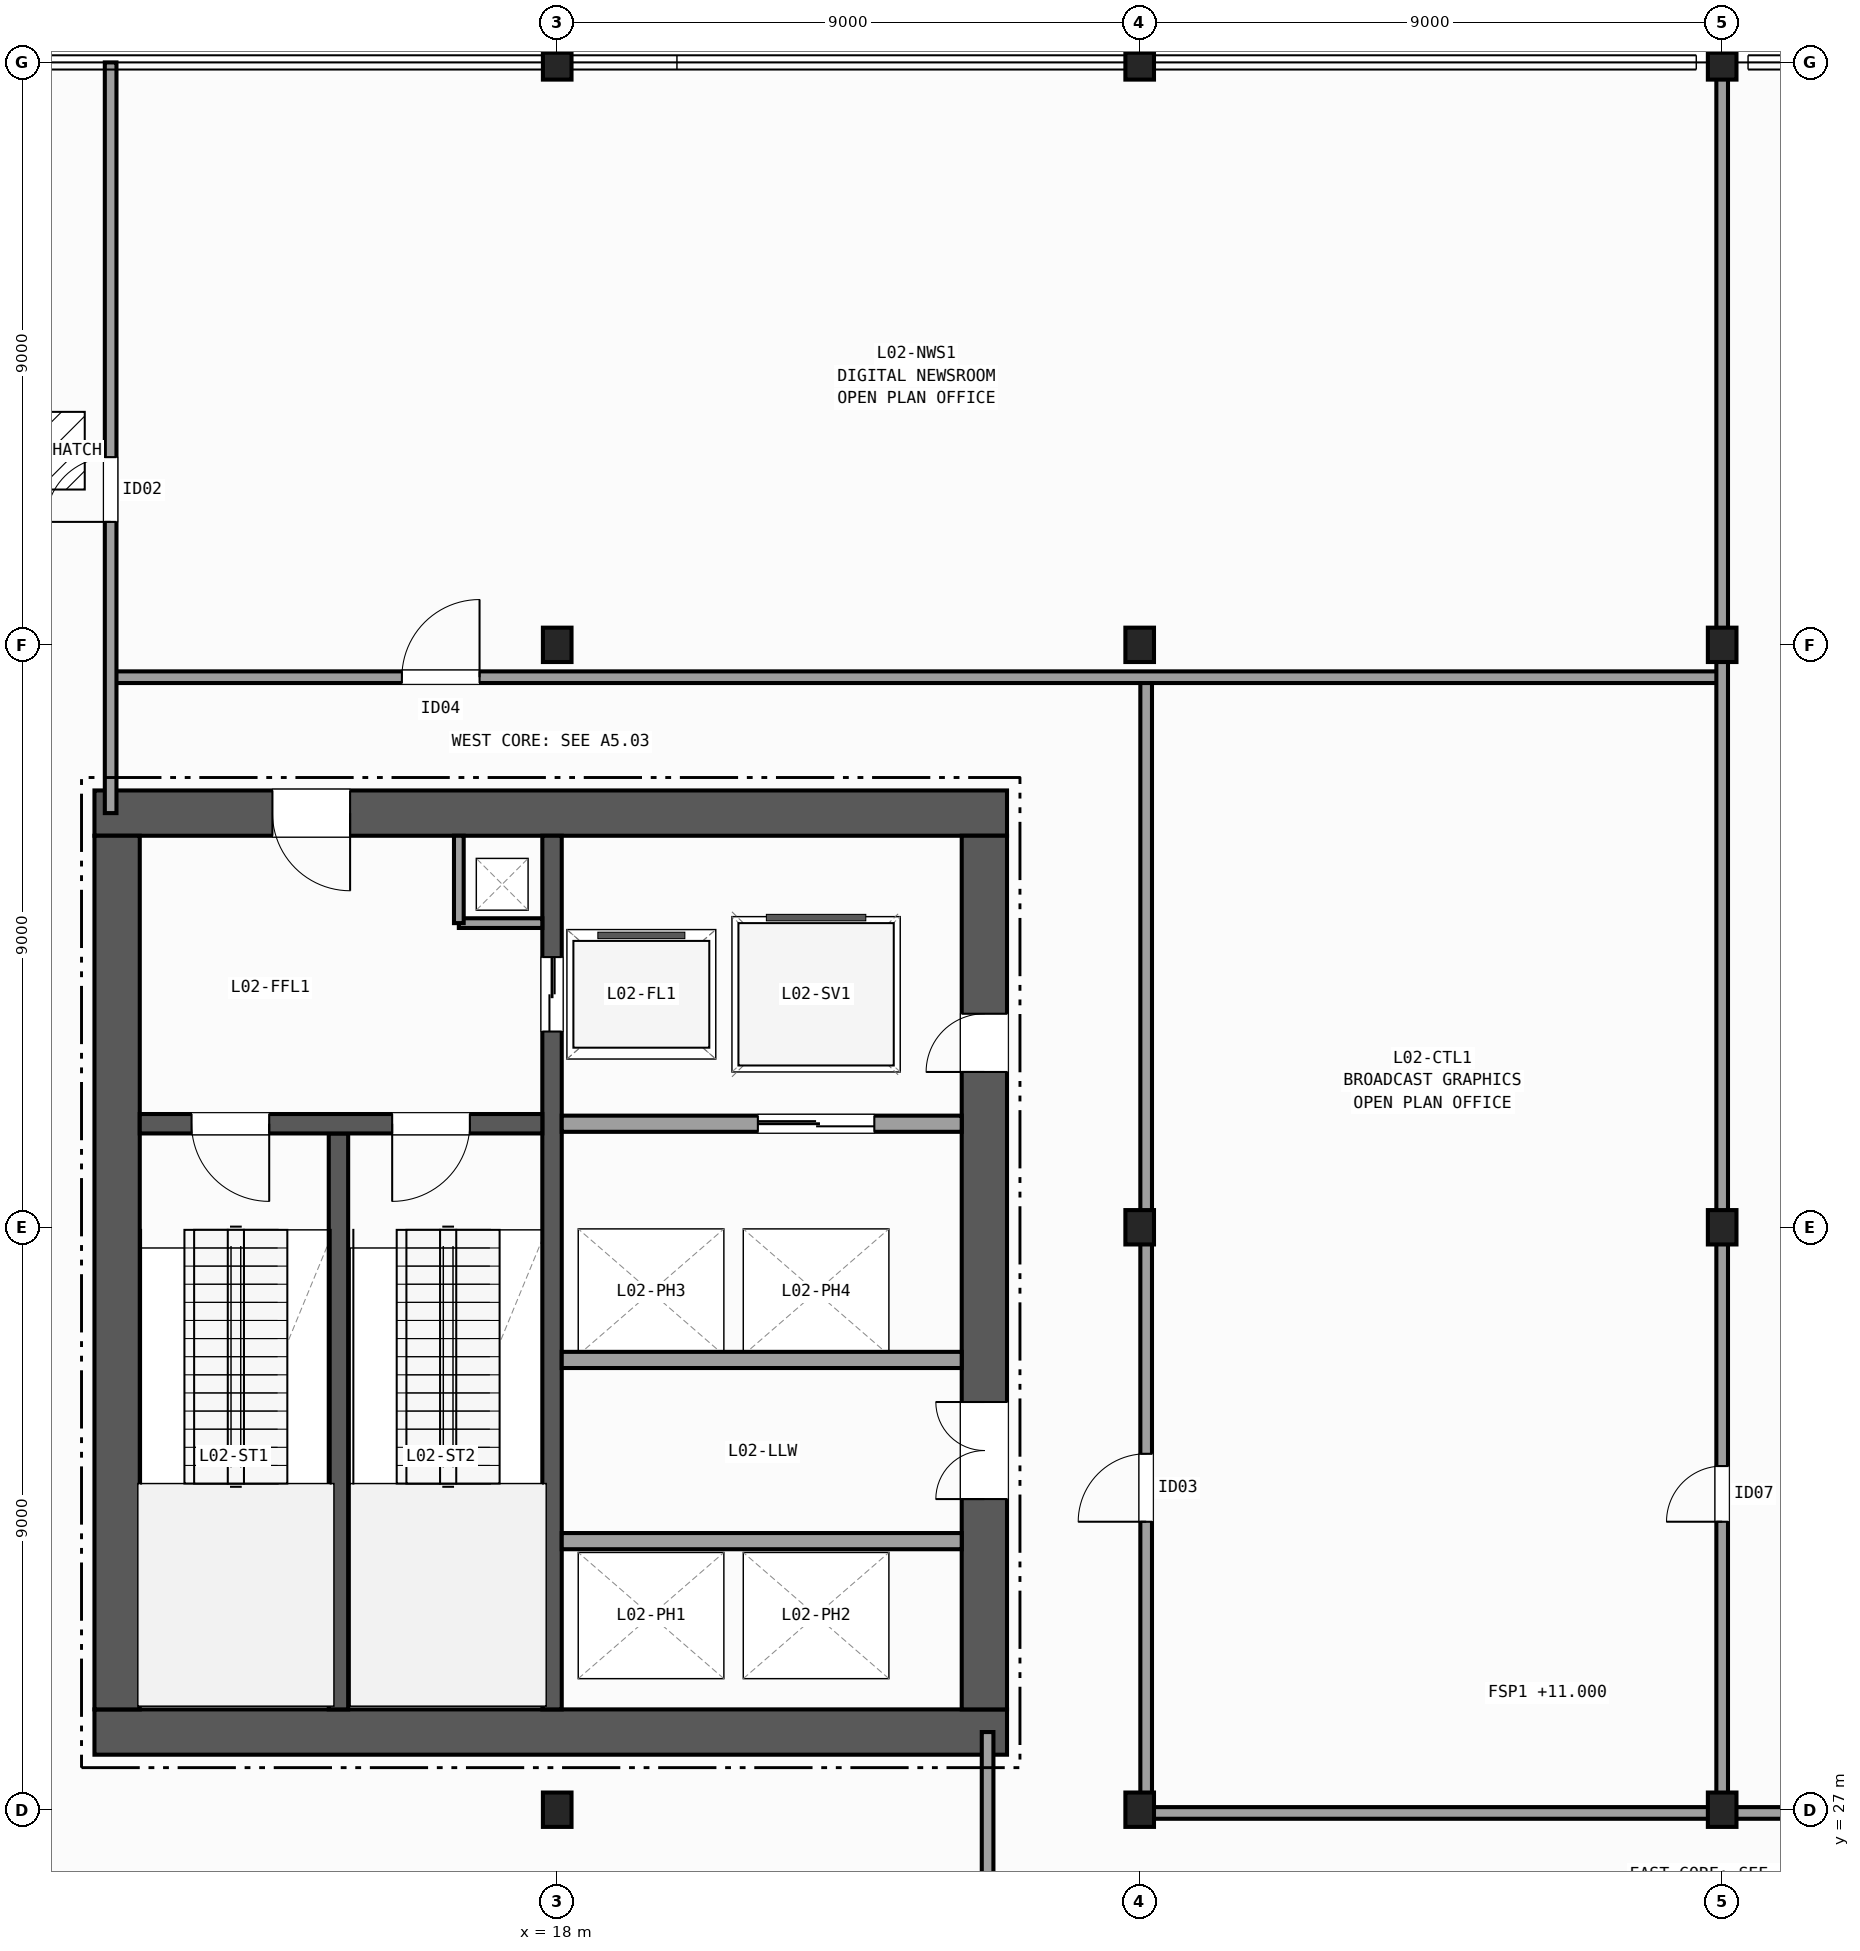
"""IFC4 building model, lengths in metres.
Left out: names, types, materials, properties, quantities, classifications, styles, units other than length and angle.
Written with IfcOpenShell. Run it as: python <this file> out.ifc"""

import sys

from ifc_helpers import new_model, si_unit, direction, frame, frame_2d, origin, origin_2d, place, context, subcontext, project, spatial, rectangle, i_section, extrude, element, fill, save


model = new_model("IFC4")
c1 = context("Model", 3, precision=1e-05, world=origin(), true_north=direction((0.0, 1.0)))
c2 = subcontext(c1, "Body", "Model", "MODEL_VIEW")
j1 = project(units=[si_unit("LENGTHUNIT", "METRE"), si_unit("PLANEANGLEUNIT", "RADIAN")], contexts=[c1])
p1 = place(None, origin())
s1 = spatial("IfcSite", under=j1, at=p1, CompositionType="ELEMENT")
p2 = place(p1, origin())
s2 = spatial("IfcBuilding", under=s1, at=p2, CompositionType="ELEMENT")
p3 = place(p2, frame((0.0, 0.0, 11.0)))
s3 = spatial("IfcBuildingStorey", under=s2, at=p3, CompositionType="ELEMENT", Elevation=11.0)
for number, where, z_axis, x_axis in (
    (1, (18.0, 27.0, 0.0), (0.0, 0.0, 1.0), (1.0, 0.0, 0.0)),
    (2, (18.0, 45.0, 0.0), (0.0, 0.0, 1.0), (1.0, 0.0, 0.0)),
    (3, (18.0, 54.0, 0.0), (0.0, 0.0, 1.0), (1.0, 0.0, 0.0)),
    (4, (27.0, 27.0, 0.0), (0.0, 0.0, 1.0), (1.0, 0.0, 0.0)),
    (5, (27.0, 36.0, 0.0), (0.0, 0.0, 1.0), (1.0, 0.0, 0.0)),
    (6, (27.0, 45.0, 0.0), (0.0, 0.0, 1.0), (1.0, 0.0, 0.0)),
    (7, (27.0, 54.0, 0.0), (0.0, 0.0, 1.0), (1.0, 0.0, 0.0)),
    (8, (36.0, 27.0, 0.0), (0.0, 0.0, 1.0), (1.0, 0.0, 0.0)),
    (9, (36.0, 36.0, 0.0), (0.0, 0.0, 1.0), (1.0, 0.0, 0.0)),
    (10, (36.0, 45.0, 0.0), (0.0, 0.0, 1.0), (1.0, 0.0, 0.0)),
    (11, (36.0, 54.0, 0.0), (0.0, 0.0, 1.0), (1.0, 0.0, 0.0)),
):
    element("IfcColumn", number, at=place(p3, frame(where, z_axis=z_axis, x_axis=x_axis)), inside=s3, PredefinedType="COLUMN", context=c2, shape_type="SweptSolid", body=[
        extrude(i_section(OverallWidth=0.442, OverallDepth=0.531, WebThickness=0.066, FlangeThickness=0.106, FilletRadius=0.015, at=origin_2d()), origin(), (0.0, 0.0, 1.0), 5.2),
    ])
p4 = place(p3, frame((10.85, 28.2, 0.0), z_axis=(0.0, 0.0, 1.0), x_axis=(1.0, 0.0, 0.0)))
e12 = element("IfcWall", 12, at=p4, inside=s3, PredefinedType="SHEAR", context=c2, shape_type="SweptSolid", body=[
    extrude(rectangle(XDim=14.1, YDim=0.7, at=frame_2d((7.05, 0.0))), origin(), (0.0, 0.0, 1.0), 4.88),
])
p5 = place(p3, frame((24.95, 42.4, 0.0), z_axis=(0.0, 0.0, 1.0), x_axis=(-1.0, 0.0, 0.0)))
e13 = element("IfcWall", 13, at=p5, inside=s3, PredefinedType="SHEAR", context=c2, shape_type="SweptSolid", body=[
    extrude(rectangle(XDim=14.1, YDim=0.7, at=frame_2d((7.05, 0.0))), origin(), (0.0, 0.0, 1.0), 4.88),
])
p6 = place(p5, frame((10.15, 0.0, 0.0)))
e14 = element("IfcOpeningElement", 14, at=p6, cuts=e13, PredefinedType="OPENING", context=c2, shape_type="SweptSolid", body=[
    extrude(rectangle(XDim=1.2, YDim=2.15, at=frame_2d((0.6, 1.075))), frame((0.0, 0.36, 0.0), z_axis=(0.0, -1.0, 0.0), x_axis=(1.0, 0.0, 0.0)), (0.0, 0.0, 1.0), 0.72),
])
p7 = place(p3, frame((11.2, 42.05, 0.0), z_axis=(0.0, 0.0, 1.0), x_axis=(0.0, -1.0, 0.0)))
e15 = element("IfcWall", 15, at=p7, inside=s3, PredefinedType="SHEAR", context=c2, shape_type="SweptSolid", body=[
    extrude(rectangle(XDim=13.5, YDim=0.7, at=frame_2d((6.75, 0.0))), origin(), (0.0, 0.0, 1.0), 4.88),
])
p8 = place(p3, frame((24.6, 28.55, 0.0), z_axis=(0.0, 0.0, 1.0), x_axis=(0.0, 1.0, 0.0)))
e16 = element("IfcWall", 16, at=p8, inside=s3, PredefinedType="SHEAR", context=c2, shape_type="SweptSolid", body=[
    extrude(rectangle(XDim=13.5, YDim=0.7, at=frame_2d((6.75, 0.0))), origin(), (0.0, 0.0, 1.0), 4.88),
])
p9 = place(p8, frame((3.25, 0.0, 0.0)))
e17 = element("IfcOpeningElement", 17, at=p9, cuts=e16, PredefinedType="OPENING", context=c2, shape_type="SweptSolid", body=[
    extrude(rectangle(XDim=1.5, YDim=2.2, at=frame_2d((0.75, 1.1))), frame((0.0, 0.36, 0.0), z_axis=(0.0, -1.0, 0.0), x_axis=(1.0, 0.0, 0.0)), (0.0, 0.0, 1.0), 0.72),
])
p10 = place(p8, frame((9.85, 0.0, 0.0)))
e18 = element("IfcOpeningElement", 18, at=p10, cuts=e16, PredefinedType="OPENING", context=c2, shape_type="SweptSolid", body=[
    extrude(rectangle(XDim=0.9, YDim=2.1, at=frame_2d((0.45, 1.05))), frame((0.0, 0.36, 0.0), z_axis=(0.0, -1.0, 0.0), x_axis=(1.0, 0.0, 0.0)), (0.0, 0.0, 1.0), 0.72),
])
p11 = place(p3, frame((14.62, 28.55, 0.0), z_axis=(0.0, 0.0, 1.0), x_axis=(0.0, 1.0, 0.0)))
e19 = element("IfcWall", 19, at=p11, inside=s3, PredefinedType="SHEAR", context=c2, shape_type="SweptSolid", body=[
    extrude(rectangle(XDim=8.9, YDim=0.3, at=frame_2d((4.45, 0.0))), origin(), (0.0, 0.0, 1.0), 4.88),
])
p12 = place(p3, frame((17.92, 42.05, 0.0), z_axis=(0.0, 0.0, 1.0), x_axis=(0.0, -1.0, 0.0)))
e20 = element("IfcWall", 20, at=p12, inside=s3, PredefinedType="SHEAR", context=c2, shape_type="SweptSolid", body=[
    extrude(rectangle(XDim=13.5, YDim=0.3, at=frame_2d((6.75, 0.0))), origin(), (0.0, 0.0, 1.0), 4.88),
])
p13 = place(p12, frame((1.875, 0.0, 0.0)))
e21 = element("IfcOpeningElement", 21, at=p13, cuts=e20, PredefinedType="OPENING", context=c2, shape_type="SweptSolid", body=[
    extrude(rectangle(XDim=1.15, YDim=2.15, at=frame_2d((0.575, 1.075))), frame((0.0, 0.16, 0.0), z_axis=(0.0, -1.0, 0.0), x_axis=(1.0, 0.0, 0.0)), (0.0, 0.0, 1.0), 0.32),
])
p14 = place(p3, frame((17.77, 37.6, 0.0), z_axis=(0.0, 0.0, 1.0), x_axis=(-1.0, 0.0, 0.0)))
e22 = element("IfcWall", 22, at=p14, inside=s3, PredefinedType="SHEAR", context=c2, shape_type="SweptSolid", body=[
    extrude(rectangle(XDim=6.22, YDim=0.3, at=frame_2d((3.11, 0.0))), origin(), (0.0, 0.0, 1.0), 4.88),
])
p15 = place(p14, frame((4.22, 0.0, 0.0)))
e23 = element("IfcOpeningElement", 23, at=p15, cuts=e22, PredefinedType="OPENING", context=c2, shape_type="SweptSolid", body=[
    extrude(rectangle(XDim=1.2, YDim=2.15, at=frame_2d((0.6, 1.075))), frame((0.0, 0.16, 0.0), z_axis=(0.0, -1.0, 0.0), x_axis=(1.0, 0.0, 0.0)), (0.0, 0.0, 1.0), 0.32),
])
p16 = place(p14, frame((1.12, 0.0, 0.0)))
e24 = element("IfcOpeningElement", 24, at=p16, cuts=e22, PredefinedType="OPENING", context=c2, shape_type="SweptSolid", body=[
    extrude(rectangle(XDim=1.2, YDim=2.15, at=frame_2d((0.6, 1.075))), frame((0.0, 0.16, 0.0), z_axis=(0.0, -1.0, 0.0), x_axis=(1.0, 0.0, 0.0)), (0.0, 0.0, 1.0), 0.32),
])
p17 = place(p3, frame((16.48, 40.7, 0.0), z_axis=(0.0, 0.0, 1.0), x_axis=(1.0, 0.0, 0.0)))
e25 = element("IfcWall", 25, at=p17, inside=s3, PredefinedType="PARTITIONING", context=c2, shape_type="SweptSolid", body=[
    extrude(rectangle(XDim=1.29, YDim=0.15, at=frame_2d((0.645, 0.0))), origin(), (0.0, 0.0, 1.0), 4.88),
])
p18 = place(p3, frame((16.48, 40.7, 0.0), z_axis=(0.0, 0.0, 1.0), x_axis=(0.0, 1.0, 0.0)))
e26 = element("IfcWall", 26, at=p18, inside=s3, PredefinedType="PARTITIONING", context=c2, shape_type="SweptSolid", body=[
    extrude(rectangle(XDim=1.35, YDim=0.15, at=frame_2d((0.675, 0.0))), origin(), (0.0, 0.0, 1.0), 4.88),
])
p19 = place(p3, frame((18.07, 37.6, 0.0), z_axis=(0.0, 0.0, 1.0), x_axis=(1.0, 0.0, 0.0)))
e27 = element("IfcWall", 27, at=p19, inside=s3, PredefinedType="PARTITIONING", context=c2, shape_type="SweptSolid", body=[
    extrude(rectangle(XDim=6.18, YDim=0.25, at=frame_2d((3.09, 0.0))), origin(), (0.0, 0.0, 1.0), 4.88),
])
p20 = place(p19, frame((3.03, 0.0, 0.0)))
e28 = element("IfcOpeningElement", 28, at=p20, cuts=e27, PredefinedType="OPENING", context=c2, shape_type="SweptSolid", body=[
    extrude(rectangle(XDim=1.8, YDim=2.3, at=frame_2d((0.9, 1.15))), frame((0.0, 0.135, 0.0), z_axis=(0.0, -1.0, 0.0), x_axis=(1.0, 0.0, 0.0)), (0.0, 0.0, 1.0), 0.27),
])
for number, where, z_axis, x_axis in (
    (29, (18.07, 31.15, 0.0), (0.0, 0.0, 1.0), (1.0, 0.0, 0.0)),
    (30, (24.25, 33.95, 0.0), (0.0, 0.0, 1.0), (-1.0, 0.0, 0.0)),
):
    element("IfcWall", number, at=place(p3, frame(where, z_axis=z_axis, x_axis=x_axis)), inside=s3, PredefinedType="PARTITIONING", context=c2, shape_type="SweptSolid", body=[
        extrude(rectangle(XDim=6.18, YDim=0.25, at=frame_2d((3.09, 0.0))), origin(), (0.0, 0.0, 1.0), 4.88),
    ])
p21 = place(p3, frame((24.65, 3.6, 0.0), z_axis=(0.0, 0.0, 1.0), x_axis=(0.0, 1.0, 0.0)))
e31 = element("IfcWall", 31, at=p21, inside=s3, PredefinedType="PARTITIONING", context=c2, shape_type="SweptSolid", body=[
    extrude(rectangle(XDim=24.6, YDim=0.18, at=frame_2d((12.3, 0.0))), origin(), (0.0, 0.0, 1.0), 3.912),
])
p22 = place(p21, frame((10.4, 0.0, 0.0)))
e32 = element("IfcOpeningElement", 32, at=p22, cuts=e31, PredefinedType="OPENING", context=c2, shape_type="SweptSolid", body=[
    extrude(rectangle(XDim=1.4, YDim=2.15, at=frame_2d((0.7, 1.075))), frame((0.0, 0.1, 0.0), z_axis=(0.0, -1.0, 0.0), x_axis=(1.0, 0.0, 0.0)), (0.0, 0.0, 1.0), 0.2),
])
p23 = place(p3, frame((27.1, 26.95, 0.0), z_axis=(0.0, 0.0, 1.0), x_axis=(1.0, 0.0, 0.0)))
e33 = element("IfcWall", 33, at=p23, inside=s3, PredefinedType="PARTITIONING", context=c2, shape_type="SweptSolid", body=[
    extrude(rectangle(XDim=35.9, YDim=0.18, at=frame_2d((17.95, 0.0))), origin(), (0.0, 0.0, 1.0), 3.933),
])
p24 = place(p3, frame((27.1, 26.95, 0.0), z_axis=(0.0, 0.0, 1.0), x_axis=(0.0, 1.0, 0.0)))
e34 = element("IfcWall", 34, at=p24, inside=s3, PredefinedType="PARTITIONING", context=c2, shape_type="SweptSolid", body=[
    extrude(rectangle(XDim=17.55, YDim=0.18, at=frame_2d((8.775, 0.0))), origin(), (0.0, 0.0, 1.0), 3.933),
])
p25 = place(p24, frame((4.5, 0.0, 0.0)))
e35 = element("IfcOpeningElement", 35, at=p25, cuts=e34, PredefinedType="OPENING", context=c2, shape_type="SweptSolid", body=[
    extrude(rectangle(XDim=1.05, YDim=2.15, at=frame_2d((0.525, 1.075))), frame((0.0, 0.1, 0.0), z_axis=(0.0, -1.0, 0.0), x_axis=(1.0, 0.0, 0.0)), (0.0, 0.0, 1.0), 0.2),
])
p26 = place(p3, frame((11.1, 44.5, 0.0), z_axis=(0.0, 0.0, 1.0), x_axis=(1.0, 0.0, 0.0)))
e36 = element("IfcWall", 36, at=p26, inside=s3, PredefinedType="PARTITIONING", context=c2, shape_type="SweptSolid", body=[
    extrude(rectangle(XDim=24.9, YDim=0.18, at=frame_2d((12.45, 0.0))), origin(), (0.0, 0.0, 1.0), 4.005),
])
p27 = place(p26, frame((4.5, 0.0, 0.0)))
e37 = element("IfcOpeningElement", 37, at=p27, cuts=e36, PredefinedType="OPENING", context=c2, shape_type="SweptSolid", body=[
    extrude(rectangle(XDim=1.2, YDim=2.15, at=frame_2d((0.6, 1.075))), frame((0.0, 0.1, 0.0), z_axis=(0.0, -1.0, 0.0), x_axis=(1.0, 0.0, 0.0)), (0.0, 0.0, 1.0), 0.2),
])
p28 = place(p3, frame((36.0, 26.95, 0.0), z_axis=(0.0, 0.0, 1.0), x_axis=(0.0, 1.0, 0.0)))
e38 = element("IfcWall", 38, at=p28, inside=s3, PredefinedType="PARTITIONING", context=c2, shape_type="SweptSolid", body=[
    extrude(rectangle(XDim=27.05, YDim=0.18, at=frame_2d((13.525, 0.0))), origin(), (0.0, 0.0, 1.0), 3.933),
])
p29 = place(p28, frame((4.5, 0.0, 0.0)))
e39 = element("IfcOpeningElement", 39, at=p29, cuts=e38, PredefinedType="OPENING", context=c2, shape_type="SweptSolid", body=[
    extrude(rectangle(XDim=0.86, YDim=2.05, at=frame_2d((0.43, 1.025))), frame((0.0, 0.1, 0.0), z_axis=(0.0, -1.0, 0.0), x_axis=(1.0, 0.0, 0.0)), (0.0, 0.0, 1.0), 0.2),
])
p30 = place(p3, frame((11.1, 42.4, 0.0), z_axis=(0.0, 0.0, 1.0), x_axis=(0.0, 1.0, 0.0)))
e40 = element("IfcWall", 40, at=p30, inside=s3, PredefinedType="PARTITIONING", context=c2, shape_type="SweptSolid", body=[
    extrude(rectangle(XDim=11.6, YDim=0.18, at=frame_2d((5.8, 0.0))), origin(), (0.0, 0.0, 1.0), 3.933),
])
p31 = place(p30, frame((4.5, 0.0, 0.0)))
e41 = element("IfcOpeningElement", 41, at=p31, cuts=e40, PredefinedType="OPENING", context=c2, shape_type="SweptSolid", body=[
    extrude(rectangle(XDim=1.0, YDim=2.1, at=frame_2d((0.5, 1.05))), frame((0.0, 0.1, 0.0), z_axis=(0.0, -1.0, 0.0), x_axis=(1.0, 0.0, 0.0)), (0.0, 0.0, 1.0), 0.2),
])
p32 = place(p3, frame((0.0, 0.0, -0.32)))
p33 = place(p32, frame((10.2, 48.0, 0.0)))
p34 = place(p33, frame((0.0, 0.0, 0.27)))
e42 = element("IfcDoor", 42, at=p34, inside=s3, OperationType="SINGLE_SWING_LEFT", PredefinedType="TRAPDOOR", context=c2, shape_type="SweptSolid", body=[
    extrude(rectangle(XDim=1.0, YDim=1.2, at=origin_2d()), origin(), (0.0, 0.0, 1.0), 0.05),
])
p35 = place(p15, origin())
e43 = element("IfcDoor", 43, at=p35, inside=s3, OperationType="SINGLE_SWING_LEFT", PredefinedType="DOOR", context=c2, shape_type="SweptSolid", body=[
    extrude(rectangle(XDim=1.2, YDim=2.15, at=frame_2d((0.6, 1.075))), frame((0.0, 0.025, 0.0), z_axis=(0.0, -1.0, 0.0), x_axis=(1.0, 0.0, 0.0)), (0.0, 0.0, 1.0), 0.05),
])
fill(e23, e43)
p36 = place(p16, origin())
e44 = element("IfcDoor", 44, at=p36, inside=s3, OperationType="SINGLE_SWING_RIGHT", PredefinedType="DOOR", context=c2, shape_type="SweptSolid", body=[
    extrude(rectangle(XDim=1.2, YDim=2.15, at=frame_2d((0.6, 1.075))), frame((0.0, 0.025, 0.0), z_axis=(0.0, -1.0, 0.0), x_axis=(1.0, 0.0, 0.0)), (0.0, 0.0, 1.0), 0.05),
])
fill(e24, e44)
p37 = place(p9, origin())
e45 = element("IfcDoor", 45, at=p37, inside=s3, OperationType="DOUBLE_DOOR_SINGLE_SWING", PredefinedType="DOOR", context=c2, shape_type="SweptSolid", body=[
    extrude(rectangle(XDim=1.5, YDim=2.2, at=frame_2d((0.75, 1.1))), frame((0.0, 0.025, 0.0), z_axis=(0.0, -1.0, 0.0), x_axis=(1.0, 0.0, 0.0)), (0.0, 0.0, 1.0), 0.05),
])
fill(e17, e45)
p38 = place(p6, origin())
e46 = element("IfcDoor", 46, at=p38, inside=s3, OperationType="SINGLE_SWING_LEFT", PredefinedType="DOOR", context=c2, shape_type="SweptSolid", body=[
    extrude(rectangle(XDim=1.2, YDim=2.15, at=frame_2d((0.6, 1.075))), frame((0.0, 0.025, 0.0), z_axis=(0.0, -1.0, 0.0), x_axis=(1.0, 0.0, 0.0)), (0.0, 0.0, 1.0), 0.05),
])
fill(e14, e46)
p39 = place(p10, origin())
e47 = element("IfcDoor", 47, at=p39, inside=s3, OperationType="SINGLE_SWING_LEFT", PredefinedType="DOOR", context=c2, shape_type="SweptSolid", body=[
    extrude(rectangle(XDim=0.9, YDim=2.1, at=frame_2d((0.45, 1.05))), frame((0.0, 0.025, 0.0), z_axis=(0.0, -1.0, 0.0), x_axis=(1.0, 0.0, 0.0)), (0.0, 0.0, 1.0), 0.05),
])
fill(e18, e47)
p40 = place(p13, origin())
e48 = element("IfcDoor", 48, at=p40, inside=s3, OperationType="DOUBLE_DOOR_SLIDING", PredefinedType="DOOR", context=c2, shape_type="SweptSolid", body=[
    extrude(rectangle(XDim=1.15, YDim=2.15, at=frame_2d((0.575, 1.075))), frame((0.0, 0.025, 0.0), z_axis=(0.0, -1.0, 0.0), x_axis=(1.0, 0.0, 0.0)), (0.0, 0.0, 1.0), 0.05),
])
fill(e21, e48)
p41 = place(p20, origin())
e49 = element("IfcDoor", 49, at=p41, inside=s3, OperationType="DOUBLE_DOOR_SLIDING", PredefinedType="DOOR", context=c2, shape_type="SweptSolid", body=[
    extrude(rectangle(XDim=1.8, YDim=2.3, at=frame_2d((0.9, 1.15))), frame((0.0, 0.025, 0.0), z_axis=(0.0, -1.0, 0.0), x_axis=(1.0, 0.0, 0.0)), (0.0, 0.0, 1.0), 0.05),
])
fill(e28, e49)
p42 = place(p25, origin())
e50 = element("IfcDoor", 50, at=p42, inside=s3, OperationType="SINGLE_SWING_LEFT", PredefinedType="DOOR", context=c2, shape_type="SweptSolid", body=[
    extrude(rectangle(XDim=1.05, YDim=2.15, at=frame_2d((0.525, 1.075))), frame((0.0, 0.025, 0.0), z_axis=(0.0, -1.0, 0.0), x_axis=(1.0, 0.0, 0.0)), (0.0, 0.0, 1.0), 0.05),
])
fill(e35, e50)
p43 = place(p27, origin())
e51 = element("IfcDoor", 51, at=p43, inside=s3, OperationType="SINGLE_SWING_RIGHT", PredefinedType="DOOR", context=c2, shape_type="SweptSolid", body=[
    extrude(rectangle(XDim=1.2, YDim=2.15, at=frame_2d((0.6, 1.075))), frame((0.0, 0.025, 0.0), z_axis=(0.0, -1.0, 0.0), x_axis=(1.0, 0.0, 0.0)), (0.0, 0.0, 1.0), 0.05),
])
fill(e37, e51)
p44 = place(p29, origin())
e52 = element("IfcDoor", 52, at=p44, inside=s3, OperationType="SINGLE_SWING_LEFT", PredefinedType="DOOR", context=c2, shape_type="SweptSolid", body=[
    extrude(rectangle(XDim=0.86, YDim=2.05, at=frame_2d((0.43, 1.025))), frame((0.0, 0.025, 0.0), z_axis=(0.0, -1.0, 0.0), x_axis=(1.0, 0.0, 0.0)), (0.0, 0.0, 1.0), 0.05),
])
fill(e39, e52)
p45 = place(p31, origin())
e53 = element("IfcDoor", 53, at=p45, inside=s3, OperationType="SINGLE_SWING_LEFT", PredefinedType="DOOR", context=c2, shape_type="SweptSolid", body=[
    extrude(rectangle(XDim=1.0, YDim=2.1, at=frame_2d((0.5, 1.05))), frame((0.0, 0.025, 0.0), z_axis=(0.0, -1.0, 0.0), x_axis=(1.0, 0.0, 0.0)), (0.0, 0.0, 1.0), 0.05),
])
fill(e41, e53)
save(model, sys.argv[1])
